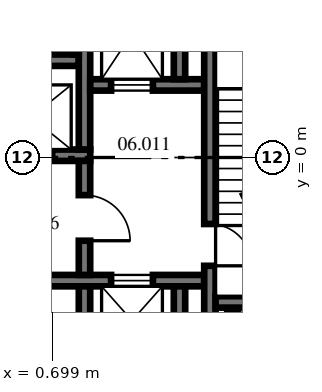
"""IFC4 building model, lengths in metres.
Left out: names, types, materials, properties, quantities, classifications, styles, units other than length and angle.
Written with IfcOpenShell. Run it as: python <this file> out.ifc"""

import sys

from ifc_helpers import new_model, si_unit, direction, frame, frame_2d, origin, place, context, subcontext, project, spatial, polyline, rectangle, outline, extrude, source, transform, mapped, element, fill, save


model = new_model("IFC4")
c1 = context("Model", 3, precision=1e-05, world=origin(), true_north=direction((0.0, 1.0)))
c2 = subcontext(c1, "Body", "Model", "MODEL_VIEW")
j1 = project(units=[si_unit("LENGTHUNIT", "METRE"), si_unit("PLANEANGLEUNIT", "RADIAN")], contexts=[c1])
p1 = place(None, origin())
s1 = spatial("IfcSite", under=j1, at=p1, CompositionType="ELEMENT")
p2 = place(p1, origin())
s2 = spatial("IfcBuilding", under=s1, at=p2, CompositionType="ELEMENT")
p3 = place(p2, frame((0.0, 0.0, 28.9)))
s3 = spatial("IfcBuildingStorey", under=s2, at=p3, CompositionType="ELEMENT", Elevation=28.9)
m1 = source(origin(), c2, "Body", "SweptSolid", [
    extrude(rectangle(XDim=11.5, YDim=0.3, at=frame_2d((5.75, 0.0))), origin(), (0.0, 0.0, 1.0), 4.1),
])
p4 = place(p3, frame((-9.8, 0.06, 0.0), z_axis=(0.0, 0.0, 1.0), x_axis=(1.0, 0.0, 0.0)))
e1 = element("IfcWall", 1, at=p4, inside=s3, PredefinedType="SHEAR", context=c2, shape_type="MappedRepresentation", body=[
    mapped(m1, transform((0.0, 0.0, 0.0), scale=1.0)),
])
p5 = place(p4, frame((1.0, 0.0, 0.0)))
e2 = element("IfcOpeningElement", 2, at=p5, cuts=e1, PredefinedType="OPENING", context=c2, shape_type="SweptSolid", body=[
    extrude(rectangle(XDim=1.1, YDim=2.1, at=frame_2d((0.55, 1.05))), frame((0.0, 0.16, 0.0), z_axis=(0.0, -1.0, 0.0), x_axis=(1.0, 0.0, 0.0)), (0.0, 0.0, 1.0), 0.32),
])
p6 = place(p4, frame((3.8, 0.0, 0.0)))
e3 = element("IfcOpeningElement", 3, at=p6, cuts=e1, PredefinedType="OPENING", context=c2, shape_type="SweptSolid", body=[
    extrude(rectangle(XDim=1.1, YDim=2.1, at=frame_2d((0.55, 1.05))), frame((0.0, 0.16, 0.0), z_axis=(0.0, -1.0, 0.0), x_axis=(1.0, 0.0, 0.0)), (0.0, 0.0, 1.0), 0.32),
])
p7 = place(p4, frame((6.6, 0.0, 0.0)))
e4 = element("IfcOpeningElement", 4, at=p7, cuts=e1, PredefinedType="OPENING", context=c2, shape_type="SweptSolid", body=[
    extrude(rectangle(XDim=1.1, YDim=2.1, at=frame_2d((0.55, 1.05))), frame((0.0, 0.16, 0.0), z_axis=(0.0, -1.0, 0.0), x_axis=(1.0, 0.0, 0.0)), (0.0, 0.0, 1.0), 0.32),
])
p8 = place(p4, frame((9.4, 0.0, 0.0)))
e5 = element("IfcOpeningElement", 5, at=p8, cuts=e1, PredefinedType="OPENING", context=c2, shape_type="SweptSolid", body=[
    extrude(rectangle(XDim=1.1, YDim=2.1, at=frame_2d((0.55, 1.05))), frame((0.0, 0.16, 0.0), z_axis=(0.0, -1.0, 0.0), x_axis=(1.0, 0.0, 0.0)), (0.0, 0.0, 1.0), 0.32),
])
m2 = source(origin(), c2, "Body", "SweptSolid", [
    extrude(outline(polyline([(11.2, -0.15), (-0.349, -0.15), (-0.176, 0.15), (11.2, 0.15), (11.2, -0.15)])), origin(), (0.0, 0.0, 1.0), 4.1),
])
p9 = place(p3, frame((-9.8, 2.56, 0.0), z_axis=(0.0, 0.0, 1.0), x_axis=(1.0, 0.0, 0.0)))
e6 = element("IfcWall", 6, at=p9, inside=s3, PredefinedType="SHEAR", context=c2, shape_type="MappedRepresentation", body=[
    mapped(m2, transform((0.0, 0.0, 0.0), scale=1.0)),
])
m3 = source(origin(), c2, "Body", "SweptSolid", [
    extrude(rectangle(XDim=4.45, YDim=0.3, at=frame_2d((2.225, 0.0))), origin(), (0.0, 0.0, 1.0), 4.1),
])
p10 = place(p3, frame((1.55, 0.21, 0.0), z_axis=(0.0, 0.0, 1.0), x_axis=(0.0, 1.0, 0.0)))
e7 = element("IfcWall", 7, at=p10, inside=s3, PredefinedType="SHEAR", context=c2, shape_type="MappedRepresentation", body=[
    mapped(m3, transform((0.0, 0.0, 0.0), scale=1.0)),
])
m4 = source(origin(), c2, "Body", "SweptSolid", [
    extrude(rectangle(XDim=3.0, YDim=0.3, at=frame_2d((1.5, 0.0))), origin(), (0.0, 0.0, 1.0), 4.1),
])
p11 = place(p3, frame((1.7, 1.91, 0.0), z_axis=(0.0, 0.0, 1.0), x_axis=(1.0, 0.0, 0.0)))
e8 = element("IfcWall", 8, at=p11, inside=s3, PredefinedType="SHEAR", context=c2, shape_type="MappedRepresentation", body=[
    mapped(m4, transform((0.0, 0.0, 0.0), scale=1.0)),
])
p12 = place(p11, frame((0.55, 0.0, 0.0)))
e9 = element("IfcOpeningElement", 9, at=p12, cuts=e8, PredefinedType="OPENING", context=c2, shape_type="SweptSolid", body=[
    extrude(rectangle(XDim=1.1, YDim=2.1, at=frame_2d((0.55, 1.05))), frame((0.0, 0.16, 0.0), z_axis=(0.0, -1.0, 0.0), x_axis=(1.0, 0.0, 0.0)), (0.0, 0.0, 1.0), 0.32),
])
m5 = source(origin(), c2, "Body", "SweptSolid", [
    extrude(rectangle(XDim=2.9, YDim=0.3, at=frame_2d((1.45, 0.0))), origin(), (0.0, 0.0, 1.0), 4.1),
])
p13 = place(p3, frame((4.05, 2.06, 0.0), z_axis=(0.0, 0.0, 1.0), x_axis=(0.0, 1.0, 0.0)))
e10 = element("IfcWall", 10, at=p13, inside=s3, PredefinedType="SHEAR", context=c2, shape_type="MappedRepresentation", body=[
    mapped(m5, transform((0.0, 0.0, 0.0), scale=1.0)),
])
m6 = source(origin(), c2, "Body", "SweptSolid", [
    extrude(rectangle(XDim=12.8, YDim=0.3, at=frame_2d((6.4, 0.0))), origin(), (0.0, 0.0, 1.0), 4.1),
])
p14 = place(p3, frame((-8.1, -3.24, 0.0), z_axis=(0.0, 0.0, 1.0), x_axis=(1.0, 0.0, 0.0)))
e11 = element("IfcWall", 11, at=p14, inside=s3, PredefinedType="SHEAR", context=c2, shape_type="MappedRepresentation", body=[
    mapped(m6, transform((0.0, 0.0, 0.0), scale=1.0)),
])
p15 = place(p14, frame((0.913, 0.0, 0.0)))
e12 = element("IfcOpeningElement", 12, at=p15, cuts=e11, PredefinedType="OPENING", context=c2, shape_type="SweptSolid", body=[
    extrude(rectangle(XDim=0.9, YDim=2.1, at=frame_2d((0.45, 1.05))), frame((0.0, 0.16, 0.0), z_axis=(0.0, -1.0, 0.0), x_axis=(1.0, 0.0, 0.0)), (0.0, 0.0, 1.0), 0.32),
])
p16 = place(p14, frame((3.05, 0.0, 0.0)))
e13 = element("IfcOpeningElement", 13, at=p16, cuts=e11, PredefinedType="OPENING", context=c2, shape_type="SweptSolid", body=[
    extrude(rectangle(XDim=0.9, YDim=2.1, at=frame_2d((0.45, 1.05))), frame((0.0, 0.16, 0.0), z_axis=(0.0, -1.0, 0.0), x_axis=(1.0, 0.0, 0.0)), (0.0, 0.0, 1.0), 0.32),
])
p17 = place(p14, frame((6.587, 0.0, 0.0)))
e14 = element("IfcOpeningElement", 14, at=p17, cuts=e11, PredefinedType="OPENING", context=c2, shape_type="SweptSolid", body=[
    extrude(rectangle(XDim=0.9, YDim=2.1, at=frame_2d((0.45, 1.05))), frame((0.0, 0.16, 0.0), z_axis=(0.0, -1.0, 0.0), x_axis=(1.0, 0.0, 0.0)), (0.0, 0.0, 1.0), 0.32),
])
p18 = place(p14, frame((10.35, 0.0, 0.0)))
e15 = element("IfcOpeningElement", 15, at=p18, cuts=e11, PredefinedType="OPENING", context=c2, shape_type="SweptSolid", body=[
    extrude(rectangle(XDim=1.1, YDim=2.1, at=frame_2d((0.55, 1.05))), frame((0.0, 0.16, 0.0), z_axis=(0.0, -1.0, 0.0), x_axis=(1.0, 0.0, 0.0)), (0.0, 0.0, 1.0), 0.32),
])
m7 = source(origin(), c2, "Body", "SweptSolid", [
    extrude(rectangle(XDim=2.2, YDim=0.3, at=frame_2d((1.1, 0.0))), origin(), (0.0, 0.0, 1.0), 4.1),
])
p19 = place(p3, frame((1.55, -5.59, 0.0), z_axis=(0.0, 0.0, 1.0), x_axis=(0.0, 1.0, 0.0)))
e16 = element("IfcWall", 16, at=p19, inside=s3, PredefinedType="SHEAR", context=c2, shape_type="MappedRepresentation", body=[
    mapped(m7, transform((0.0, 0.0, 0.0), scale=1.0)),
])
m8 = source(origin(), c2, "Body", "SweptSolid", [
    extrude(rectangle(XDim=2.5, YDim=0.3, at=frame_2d((1.25, 0.0))), origin(), (0.0, 0.0, 1.0), 4.1),
])
p20 = place(p3, frame((4.05, -5.89, 0.0), z_axis=(0.0, 0.0, 1.0), x_axis=(0.0, 1.0, 0.0)))
e17 = element("IfcWall", 17, at=p20, inside=s3, PredefinedType="SHEAR", context=c2, shape_type="MappedRepresentation", body=[
    mapped(m8, transform((0.0, 0.0, 0.0), scale=1.0)),
])
p21 = place(p3, frame((1.55, -3.09, 0.0), z_axis=(0.0, 0.0, 1.0), x_axis=(0.0, 1.0, 0.0)))
e18 = element("IfcWall", 18, at=p21, inside=s3, PredefinedType="SHEAR", context=c2, shape_type="MappedRepresentation", body=[
    mapped(m4, transform((0.0, 0.0, 0.0), scale=1.0)),
])
p22 = place(p21, frame((0.9, 0.0, 0.0)))
e19 = element("IfcOpeningElement", 19, at=p22, cuts=e18, PredefinedType="OPENING", context=c2, shape_type="SweptSolid", body=[
    extrude(rectangle(XDim=1.2, YDim=2.1, at=frame_2d((0.6, 1.05))), frame((0.0, 0.16, 0.0), z_axis=(0.0, -1.0, 0.0), x_axis=(1.0, 0.0, 0.0)), (0.0, 0.0, 1.0), 0.32),
])
m9 = source(origin(), c2, "Body", "SweptSolid", [
    extrude(outline(polyline([(-0.15, -0.15), (9.99, -0.15), (9.99, 0.15), (0.15, 0.15), (-0.15, -0.15)])), origin(), (0.0, 0.0, 1.0), 4.1),
])
p23 = place(p3, frame((4.85, -6.04, 0.0), z_axis=(0.0, 0.0, 1.0), x_axis=(0.0, 1.0, 0.0)))
e20 = element("IfcWall", 20, at=p23, inside=s3, PredefinedType="SHEAR", context=c2, shape_type="MappedRepresentation", body=[
    mapped(m9, transform((0.0, 0.0, 0.0), scale=1.0)),
])
p24 = place(p23, frame((3.19, 0.0, 0.0)))
e21 = element("IfcOpeningElement", 21, at=p24, cuts=e20, PredefinedType="OPENING", context=c2, shape_type="SweptSolid", body=[
    extrude(rectangle(XDim=1.1, YDim=2.1, at=frame_2d((0.55, 1.05))), frame((0.0, 0.16, 0.0), z_axis=(0.0, -1.0, 0.0), x_axis=(1.0, 0.0, 0.0)), (0.0, 0.0, 1.0), 0.32),
])
m10 = source(origin(), c2, "Body", "SweptSolid", [
    extrude(outline(polyline([(0.0, -0.15), (0.0, 0.15), (4.433, 0.15), (4.26, -0.15), (0.0, -0.15)])), origin(), (0.0, 0.0, 1.0), 4.1),
])
p25 = place(p3, frame((5.0, -3.8, 0.0), z_axis=(0.0, 0.0, 1.0), x_axis=(1.0, 0.0, 0.0)))
e22 = element("IfcWall", 22, at=p25, inside=s3, PredefinedType="SHEAR", context=c2, shape_type="MappedRepresentation", body=[
    mapped(m10, transform((0.0, 0.0, 0.0), scale=1.0)),
])
p26 = place(p25, frame((2.45, 0.0, 0.0)))
e23 = element("IfcOpeningElement", 23, at=p26, cuts=e22, PredefinedType="OPENING", context=c2, shape_type="SweptSolid", body=[
    extrude(rectangle(XDim=1.1, YDim=2.1, at=frame_2d((0.55, 1.05))), frame((0.0, 0.16, 0.0), z_axis=(0.0, -1.0, 0.0), x_axis=(1.0, 0.0, 0.0)), (0.0, 0.0, 1.0), 0.32),
])
m11 = source(origin(), c2, "Body", "SweptSolid", [
    extrude(rectangle(XDim=3.18, YDim=0.15, at=frame_2d((1.59, 0.0))), origin(), (0.0, 0.0, 1.0), 4.1),
])
p27 = place(p3, frame((1.325, 2.71, 0.0), z_axis=(0.0, 0.0, 1.0), x_axis=(0.0, 1.0, 0.0)))
e24 = element("IfcWall", 24, at=p27, inside=s3, PredefinedType="PARTITIONING", context=c2, shape_type="MappedRepresentation", body=[
    mapped(m11, transform((0.0, 0.0, 0.0), scale=1.0)),
])
p28 = place(p27, frame((2.265, 0.0, 0.0)))
e25 = element("IfcOpeningElement", 25, at=p28, cuts=e24, PredefinedType="OPENING", context=c2, shape_type="SweptSolid", body=[
    extrude(rectangle(XDim=0.9, YDim=2.1, at=frame_2d((0.45, 1.05))), frame((0.0, 0.085, 0.0), z_axis=(0.0, -1.0, 0.0), x_axis=(1.0, 0.0, 0.0)), (0.0, 0.0, 1.0), 0.17),
])
p29 = place(p24, frame((1.1, 0.0, 0.0), z_axis=(0.0, 0.0, 1.0), x_axis=(-1.0, 0.0, 0.0)))
e26 = element("IfcDoor", 26, at=p29, inside=s3, OperationType="SINGLE_SWING_RIGHT", PredefinedType="DOOR", context=c2, shape_type="SweptSolid", body=[
    extrude(rectangle(XDim=1.1, YDim=2.1, at=frame_2d((0.55, 1.05))), frame((0.0, 0.025, 0.0), z_axis=(0.0, -1.0, 0.0), x_axis=(1.0, 0.0, 0.0)), (0.0, 0.0, 1.0), 0.05),
])
fill(e21, e26)
p30 = place(p22, frame((1.2, 0.0, 0.0), z_axis=(0.0, 0.0, 1.0), x_axis=(-1.0, 0.0, 0.0)))
e27 = element("IfcDoor", 27, at=p30, inside=s3, OperationType="SINGLE_SWING_RIGHT", PredefinedType="DOOR", context=c2, shape_type="SweptSolid", body=[
    extrude(rectangle(XDim=1.2, YDim=2.1, at=frame_2d((0.6, 1.05))), frame((0.0, 0.025, 0.0), z_axis=(0.0, -1.0, 0.0), x_axis=(1.0, 0.0, 0.0)), (0.0, 0.0, 1.0), 0.05),
])
fill(e19, e27)
p31 = place(p12, origin())
e28 = element("IfcDoor", 28, at=p31, inside=s3, OperationType="DOUBLE_DOOR_SLIDING", PredefinedType="DOOR", context=c2, shape_type="SweptSolid", body=[
    extrude(rectangle(XDim=1.1, YDim=2.1, at=frame_2d((0.55, 1.05))), frame((0.0, 0.025, 0.0), z_axis=(0.0, -1.0, 0.0), x_axis=(1.0, 0.0, 0.0)), (0.0, 0.0, 1.0), 0.05),
])
fill(e9, e28)
p32 = place(p18, origin())
e29 = element("IfcDoor", 29, at=p32, inside=s3, OperationType="DOUBLE_DOOR_SLIDING", PredefinedType="DOOR", context=c2, shape_type="SweptSolid", body=[
    extrude(rectangle(XDim=1.1, YDim=2.1, at=frame_2d((0.55, 1.05))), frame((0.0, 0.025, 0.0), z_axis=(0.0, -1.0, 0.0), x_axis=(1.0, 0.0, 0.0)), (0.0, 0.0, 1.0), 0.05),
])
fill(e15, e29)
save(model, sys.argv[1])
